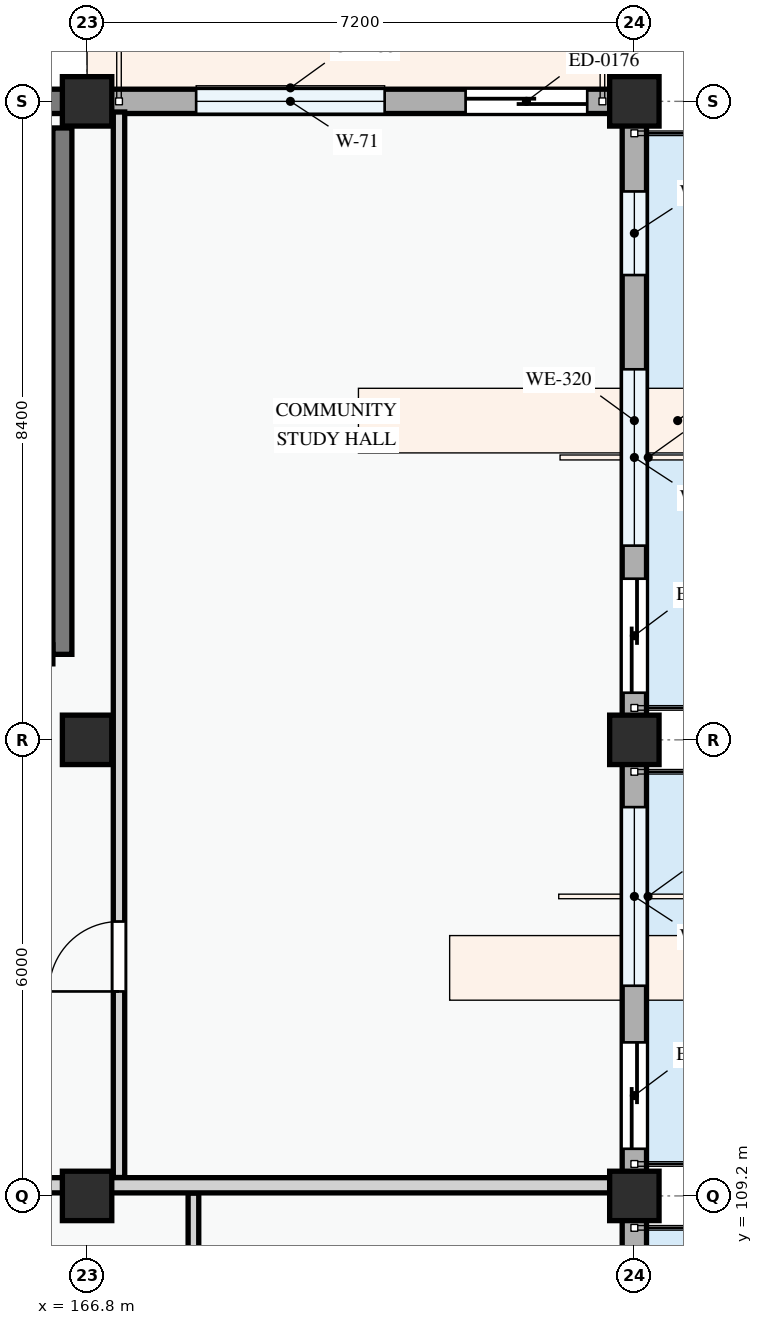
"""IFC4 building model, lengths in metres.
Left out: names, types, materials, properties, quantities, classifications, styles, units other than length and angle.
Written with IfcOpenShell. Run it as: python <this file> out.ifc"""

import sys

from ifc_helpers import new_model, si_unit, direction, frame, frame_2d, origin, origin_2d, place, context, subcontext, project, spatial, rectangle, extrude, element, fill, save


model = new_model("IFC4")
c1 = context("Model", 3, precision=1e-05, world=origin(), true_north=direction((0.0, 1.0)))
c2 = subcontext(c1, "Body", "Model", "MODEL_VIEW")
j1 = project(units=[si_unit("LENGTHUNIT", "METRE"), si_unit("PLANEANGLEUNIT", "RADIAN")], contexts=[c1])
p1 = place(None, origin())
s1 = spatial("IfcSite", under=j1, at=p1, CompositionType="ELEMENT")
p2 = place(p1, origin())
s2 = spatial("IfcBuilding", under=s1, at=p2, CompositionType="ELEMENT")
p3 = place(p2, frame((0.0, 0.0, 18.0)))
s3 = spatial("IfcBuildingStorey", under=s2, at=p3, CompositionType="ELEMENT", Elevation=18.0)
for number, where, z_axis, x_axis in (
    (1, (166.8, 109.2, 0.0), (0.0, 0.0, 1.0), (1.0, 0.0, 0.0)),
    (2, (166.8, 115.2, 0.0), (0.0, 0.0, 1.0), (1.0, 0.0, 0.0)),
    (3, (166.8, 123.6, 0.0), (0.0, 0.0, 1.0), (1.0, 0.0, 0.0)),
    (4, (174.0, 109.2, 0.0), (0.0, 0.0, 1.0), (1.0, 0.0, 0.0)),
    (5, (174.0, 115.2, 0.0), (0.0, 0.0, 1.0), (1.0, 0.0, 0.0)),
    (6, (174.0, 123.6, 0.0), (0.0, 0.0, 1.0), (1.0, 0.0, 0.0)),
):
    element("IfcColumn", number, at=place(p3, frame(where, z_axis=z_axis, x_axis=x_axis)), inside=s3, PredefinedType="COLUMN", context=c2, shape_type="SweptSolid", body=[
        extrude(rectangle(XDim=0.65, YDim=0.65, at=origin_2d()), origin(), (0.0, 0.0, 1.0), 3.3),
    ])
p4 = place(p3, frame((174.0, 109.2, 0.0), z_axis=(0.0, 0.0, 1.0), x_axis=(0.0, 1.0, 0.0)))
e7 = element("IfcWall", 7, at=p4, inside=s3, PredefinedType="STANDARD", context=c2, shape_type="SweptSolid", body=[
    extrude(rectangle(XDim=6.0, YDim=0.32, at=frame_2d((3.0, 0.0))), origin(), (0.0, 0.0, 1.0), 2.575),
])
p5 = place(p4, frame((0.62, 0.0, 0.0)))
e8 = element("IfcOpeningElement", 8, at=p5, cuts=e7, PredefinedType="OPENING", context=c2, shape_type="SweptSolid", body=[
    extrude(rectangle(XDim=1.4, YDim=2.2, at=frame_2d((0.7, 1.1))), frame((0.0, 0.17, 0.0), z_axis=(0.0, -1.0, 0.0), x_axis=(1.0, 0.0, 0.0)), (0.0, 0.0, 1.0), 0.34),
])
p6 = place(p4, frame((2.765, 0.0, 0.78)))
e9 = element("IfcOpeningElement", 9, at=p6, cuts=e7, PredefinedType="OPENING", context=c2, shape_type="SweptSolid", body=[
    extrude(rectangle(XDim=2.35, YDim=1.55, at=frame_2d((1.175, 0.775))), frame((0.0, 0.17, 0.0), z_axis=(0.0, -1.0, 0.0), x_axis=(1.0, 0.0, 0.0)), (0.0, 0.0, 1.0), 0.34),
])
p7 = place(p3, frame((174.0, 115.2, 0.0), z_axis=(0.0, 0.0, 1.0), x_axis=(0.0, 1.0, 0.0)))
e10 = element("IfcWall", 10, at=p7, inside=s3, PredefinedType="STANDARD", context=c2, shape_type="SweptSolid", body=[
    extrude(rectangle(XDim=8.4, YDim=0.32, at=frame_2d((4.2, 0.0))), origin(), (0.0, 0.0, 1.0), 2.425),
])
p8 = place(p7, frame((0.62, 0.0, 0.0)))
e11 = element("IfcOpeningElement", 11, at=p8, cuts=e10, PredefinedType="OPENING", context=c2, shape_type="SweptSolid", body=[
    extrude(rectangle(XDim=1.5, YDim=2.2, at=frame_2d((0.75, 1.1))), frame((0.0, 0.17, 0.0), z_axis=(0.0, -1.0, 0.0), x_axis=(1.0, 0.0, 0.0)), (0.0, 0.0, 1.0), 0.34),
])
p9 = place(p7, frame((2.555, 0.0, 0.78)))
e12 = element("IfcOpeningElement", 12, at=p9, cuts=e10, PredefinedType="OPENING", context=c2, shape_type="SweptSolid", body=[
    extrude(rectangle(XDim=2.32, YDim=1.5, at=frame_2d((1.16, 0.75))), frame((0.0, 0.17, 0.0), z_axis=(0.0, -1.0, 0.0), x_axis=(1.0, 0.0, 0.0)), (0.0, 0.0, 1.0), 0.34),
])
p10 = place(p7, frame((6.115, 0.0, 0.78)))
e13 = element("IfcOpeningElement", 13, at=p10, cuts=e10, PredefinedType="OPENING", context=c2, shape_type="SweptSolid", body=[
    extrude(rectangle(XDim=1.1, YDim=1.3, at=frame_2d((0.55, 0.65))), frame((0.0, 0.17, 0.0), z_axis=(0.0, -1.0, 0.0), x_axis=(1.0, 0.0, 0.0)), (0.0, 0.0, 1.0), 0.34),
])
p11 = place(p3, frame((174.0, 123.6, 0.0), z_axis=(0.0, 0.0, 1.0), x_axis=(-1.0, 0.0, 0.0)))
e14 = element("IfcWall", 14, at=p11, inside=s3, PredefinedType="STANDARD", context=c2, shape_type="SweptSolid", body=[
    extrude(rectangle(XDim=7.2, YDim=0.32, at=frame_2d((3.6, 0.0))), origin(), (0.0, 0.0, 1.0), 2.375),
])
p12 = place(p11, frame((0.62, 0.0, 0.0)))
e15 = element("IfcOpeningElement", 15, at=p12, cuts=e14, PredefinedType="OPENING", context=c2, shape_type="SweptSolid", body=[
    extrude(rectangle(XDim=1.6, YDim=2.2, at=frame_2d((0.8, 1.1))), frame((0.0, 0.17, 0.0), z_axis=(0.0, -1.0, 0.0), x_axis=(1.0, 0.0, 0.0)), (0.0, 0.0, 1.0), 0.34),
])
p13 = place(p11, frame((3.285, 0.0, 0.78)))
e16 = element("IfcOpeningElement", 16, at=p13, cuts=e14, PredefinedType="OPENING", context=c2, shape_type="SweptSolid", body=[
    extrude(rectangle(XDim=2.48, YDim=1.46, at=frame_2d((1.24, 0.73))), frame((0.0, 0.17, 0.0), z_axis=(0.0, -1.0, 0.0), x_axis=(1.0, 0.0, 0.0)), (0.0, 0.0, 1.0), 0.34),
])
p14 = place(p3, frame((166.8, 123.6, 0.0), z_axis=(0.0, 0.0, 1.0), x_axis=(-1.0, 0.0, 0.0)))
e17 = element("IfcWall", 17, at=p14, inside=s3, PredefinedType="STANDARD", context=c2, shape_type="SweptSolid", body=[
    extrude(rectangle(XDim=0.65, YDim=0.32, at=frame_2d((0.325, 0.0))), origin(), (0.0, 0.0, 1.0), 3.04),
])
p15 = place(p3, frame((174.0, 100.8, 0.0), z_axis=(0.0, 0.0, 1.0), x_axis=(0.0, 1.0, 0.0)))
e18 = element("IfcWall", 18, at=p15, inside=s3, PredefinedType="STANDARD", context=c2, shape_type="SweptSolid", body=[
    extrude(rectangle(XDim=8.4, YDim=0.32, at=frame_2d((4.2, 0.0))), origin(), (0.0, 0.0, 1.0), 2.425),
])
p16 = place(p15, frame((3.462, 0.0, 0.0)))
e19 = element("IfcOpeningElement", 19, at=p16, cuts=e18, PredefinedType="OPENING", context=c2, shape_type="SweptSolid", body=[
    extrude(rectangle(XDim=1.2, YDim=2.15, at=frame_2d((0.6, 1.075))), frame((0.0, 0.17, 0.0), z_axis=(0.0, -1.0, 0.0), x_axis=(1.0, 0.0, 0.0)), (0.0, 0.0, 1.0), 0.34),
])
p17 = place(p15, frame((0.641, 0.0, 0.78)))
e20 = element("IfcOpeningElement", 20, at=p17, cuts=e18, PredefinedType="OPENING", context=c2, shape_type="SweptSolid", body=[
    extrude(rectangle(XDim=2.04, YDim=1.46, at=frame_2d((1.02, 0.73))), frame((0.0, 0.17, 0.0), z_axis=(0.0, -1.0, 0.0), x_axis=(1.0, 0.0, 0.0)), (0.0, 0.0, 1.0), 0.34),
])
p18 = place(p15, frame((5.836, 0.0, 0.78)))
e21 = element("IfcOpeningElement", 21, at=p18, cuts=e18, PredefinedType="OPENING", context=c2, shape_type="SweptSolid", body=[
    extrude(rectangle(XDim=1.25, YDim=1.45, at=frame_2d((0.625, 0.725))), frame((0.0, 0.17, 0.0), z_axis=(0.0, -1.0, 0.0), x_axis=(1.0, 0.0, 0.0)), (0.0, 0.0, 1.0), 0.34),
])
p19 = place(p3, frame((166.475, 123.25, 0.0), z_axis=(0.0, 0.0, 1.0), x_axis=(0.0, -1.0, 0.0)))
e22 = element("IfcWall", 22, at=p19, inside=s3, PredefinedType="SHEAR", context=c2, shape_type="SweptSolid", body=[
    extrude(rectangle(XDim=6.925, YDim=0.25, at=frame_2d((3.462, 0.0))), origin(), (0.0, 0.0, 1.0), 3.0),
])
p20 = place(p3, frame((167.22, 109.442, 0.0), z_axis=(0.0, 0.0, 1.0), x_axis=(0.0, 1.0, 0.0)))
e23 = element("IfcWall", 23, at=p20, inside=s3, PredefinedType="PARTITIONING", context=c2, shape_type="SweptSolid", body=[
    extrude(rectangle(XDim=14.018, YDim=0.15, at=frame_2d((7.009, 0.0))), origin(), (0.0, 0.0, 1.0), 2.425),
])
p21 = place(p20, frame((2.448, 0.0, 0.0)))
e24 = element("IfcOpeningElement", 24, at=p21, cuts=e23, PredefinedType="OPENING", context=c2, shape_type="SweptSolid", body=[
    extrude(rectangle(XDim=0.92, YDim=2.1, at=frame_2d((0.46, 1.05))), frame((0.0, 0.085, 0.0), z_axis=(0.0, -1.0, 0.0), x_axis=(1.0, 0.0, 0.0)), (0.0, 0.0, 1.0), 0.17),
])
p22 = place(p3, frame((168.199, 103.984, 0.0), z_axis=(0.0, 0.0, 1.0), x_axis=(0.0, 1.0, 0.0)))
e25 = element("IfcWall", 25, at=p22, inside=s3, PredefinedType="PARTITIONING", context=c2, shape_type="SweptSolid", body=[
    extrude(rectangle(XDim=5.254, YDim=0.14, at=frame_2d((2.627, 0.0))), origin(), (0.0, 0.0, 1.0), 3.0),
])
p23 = place(p3, frame((162.057, 109.34, 0.0), z_axis=(0.0, 0.0, 1.0), x_axis=(1.0, 0.0, 0.0)))
e26 = element("IfcWall", 26, at=p23, inside=s3, PredefinedType="PARTITIONING", context=c2, shape_type="SweptSolid", body=[
    extrude(rectangle(XDim=11.781, YDim=0.2, at=frame_2d((5.891, 0.0))), origin(), (0.0, 0.0, 1.0), 2.375),
])
p24 = place(p5, frame((1.4, 0.0, 0.0), z_axis=(0.0, 0.0, 1.0), x_axis=(-1.0, 0.0, 0.0)))
e27 = element("IfcDoor", 27, at=p24, inside=s3, OperationType="SLIDING_TO_LEFT", PredefinedType="DOOR", context=c2, shape_type="SweptSolid", body=[
    extrude(rectangle(XDim=1.4, YDim=2.2, at=frame_2d((0.7, 1.1))), frame((0.0, 0.025, 0.0), z_axis=(0.0, -1.0, 0.0), x_axis=(1.0, 0.0, 0.0)), (0.0, 0.0, 1.0), 0.05),
])
fill(e8, e27)
p25 = place(p6, origin())
e28 = element("IfcWindow", 28, at=p25, inside=s3, PartitioningType="DOUBLE_PANEL_VERTICAL", PredefinedType="WINDOW", context=c2, shape_type="SweptSolid", body=[
    extrude(rectangle(XDim=2.35, YDim=1.55, at=frame_2d((1.175, 0.775))), frame((0.0, 0.03, 0.0), z_axis=(0.0, -1.0, 0.0), x_axis=(1.0, 0.0, 0.0)), (0.0, 0.0, 1.0), 0.06),
])
fill(e9, e28)
p26 = place(p8, frame((1.5, 0.0, 0.0), z_axis=(0.0, 0.0, 1.0), x_axis=(-1.0, 0.0, 0.0)))
e29 = element("IfcDoor", 29, at=p26, inside=s3, OperationType="SLIDING_TO_RIGHT", PredefinedType="DOOR", context=c2, shape_type="SweptSolid", body=[
    extrude(rectangle(XDim=1.5, YDim=2.2, at=frame_2d((0.75, 1.1))), frame((0.0, 0.025, 0.0), z_axis=(0.0, -1.0, 0.0), x_axis=(1.0, 0.0, 0.0)), (0.0, 0.0, 1.0), 0.05),
])
fill(e11, e29)
p27 = place(p9, origin())
e30 = element("IfcWindow", 30, at=p27, inside=s3, PartitioningType="DOUBLE_PANEL_VERTICAL", PredefinedType="WINDOW", context=c2, shape_type="SweptSolid", body=[
    extrude(rectangle(XDim=2.32, YDim=1.5, at=frame_2d((1.16, 0.75))), frame((0.0, 0.03, 0.0), z_axis=(0.0, -1.0, 0.0), x_axis=(1.0, 0.0, 0.0)), (0.0, 0.0, 1.0), 0.06),
])
fill(e12, e30)
p28 = place(p10, origin())
e31 = element("IfcWindow", 31, at=p28, inside=s3, PartitioningType="SINGLE_PANEL", PredefinedType="WINDOW", context=c2, shape_type="SweptSolid", body=[
    extrude(rectangle(XDim=1.1, YDim=1.3, at=frame_2d((0.55, 0.65))), frame((0.0, 0.03, 0.0), z_axis=(0.0, -1.0, 0.0), x_axis=(1.0, 0.0, 0.0)), (0.0, 0.0, 1.0), 0.06),
])
fill(e13, e31)
p29 = place(p12, frame((1.6, 0.0, 0.0), z_axis=(0.0, 0.0, 1.0), x_axis=(-1.0, 0.0, 0.0)))
e32 = element("IfcDoor", 32, at=p29, inside=s3, OperationType="SLIDING_TO_LEFT", PredefinedType="DOOR", context=c2, shape_type="SweptSolid", body=[
    extrude(rectangle(XDim=1.6, YDim=2.2, at=frame_2d((0.8, 1.1))), frame((0.0, 0.025, 0.0), z_axis=(0.0, -1.0, 0.0), x_axis=(1.0, 0.0, 0.0)), (0.0, 0.0, 1.0), 0.05),
])
fill(e15, e32)
p30 = place(p13, origin())
e33 = element("IfcWindow", 33, at=p30, inside=s3, PartitioningType="DOUBLE_PANEL_VERTICAL", PredefinedType="WINDOW", context=c2, shape_type="SweptSolid", body=[
    extrude(rectangle(XDim=2.48, YDim=1.46, at=frame_2d((1.24, 0.73))), frame((0.0, 0.03, 0.0), z_axis=(0.0, -1.0, 0.0), x_axis=(1.0, 0.0, 0.0)), (0.0, 0.0, 1.0), 0.06),
])
fill(e16, e33)
p31 = place(p21, origin())
e34 = element("IfcDoor", 34, at=p31, inside=s3, OperationType="SINGLE_SWING_LEFT", PredefinedType="DOOR", context=c2, shape_type="SweptSolid", body=[
    extrude(rectangle(XDim=0.92, YDim=2.1, at=frame_2d((0.46, 1.05))), frame((0.0, 0.025, 0.0), z_axis=(0.0, -1.0, 0.0), x_axis=(1.0, 0.0, 0.0)), (0.0, 0.0, 1.0), 0.05),
])
fill(e24, e34)
save(model, sys.argv[1])
